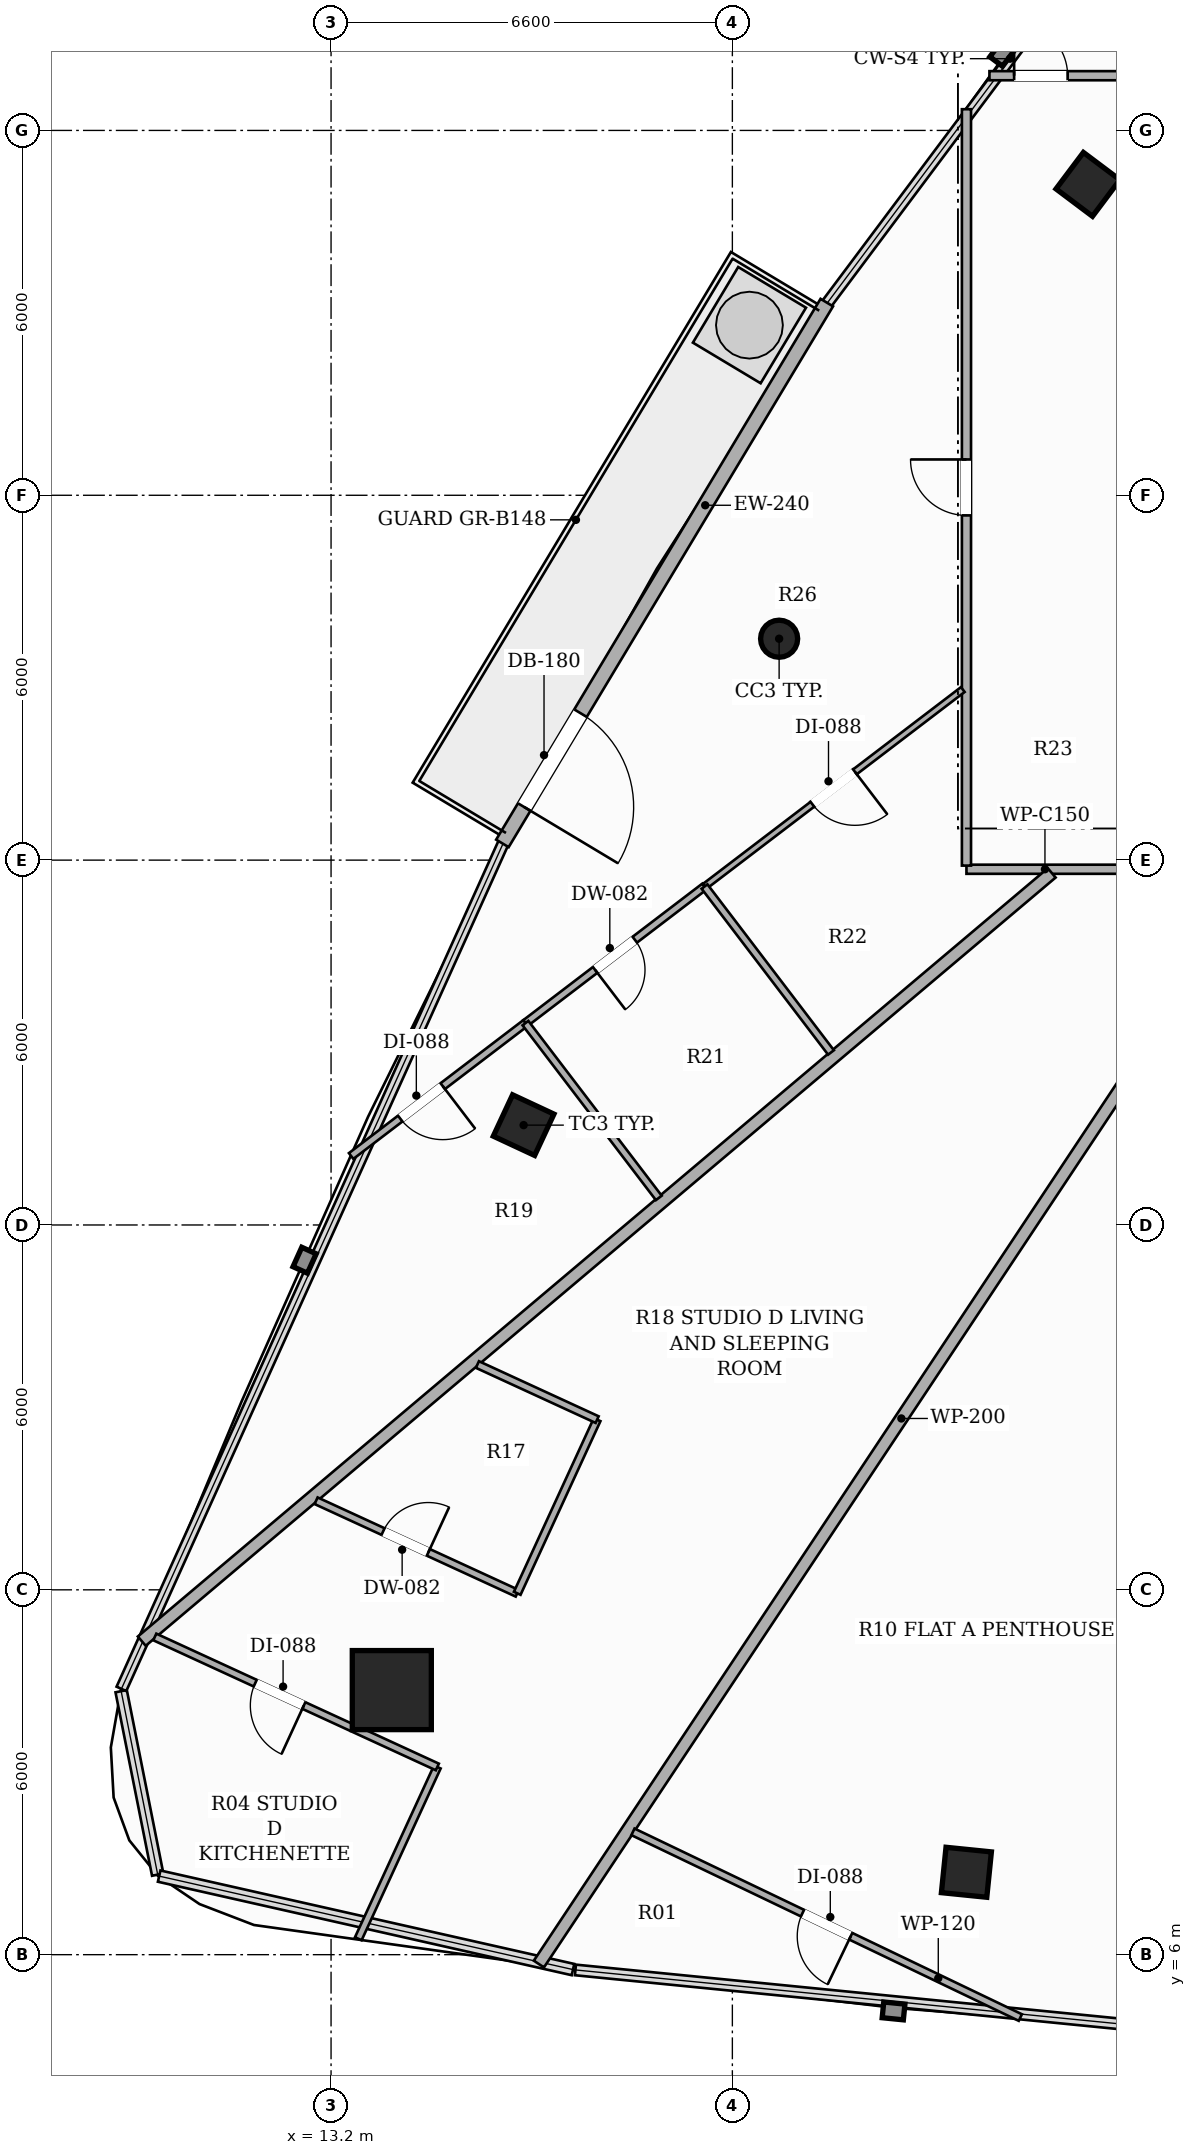
"""IFC4 building model, lengths in metres.
Left out: names, types, materials, properties, quantities, classifications, styles, units other than length and angle.
Written with IfcOpenShell. Run it as: python <this file> out.ifc"""

import sys

from ifc_helpers import new_model, si_unit, direction, frame, frame_2d, origin, origin_2d, place, context, subcontext, project, spatial, rectangle, hollow_rectangle, hollow_circle, extrude, element, fill, save


model = new_model("IFC4")
c1 = context("Model", 3, precision=1e-05, world=origin(), true_north=direction((0.0, 1.0)))
c2 = subcontext(c1, "Body", "Model", "MODEL_VIEW")
j1 = project(units=[si_unit("LENGTHUNIT", "METRE"), si_unit("PLANEANGLEUNIT", "RADIAN")], contexts=[c1])
p1 = place(None, origin())
s1 = spatial("IfcSite", under=j1, at=p1, CompositionType="ELEMENT")
p2 = place(p1, origin())
s2 = spatial("IfcBuilding", under=s1, at=p2, CompositionType="ELEMENT")
p3 = place(p2, frame((0.0, 0.0, 206.3)))
s3 = spatial("IfcBuildingStorey", under=s2, at=p3, CompositionType="ELEMENT", Elevation=206.3)
p4 = place(p3, frame((14.199, 10.351, 0.0), z_axis=(0.0, 0.0, 1.0), x_axis=(1.0, 0.0, 0.0)))
e1 = element("IfcColumn", 1, at=p4, inside=s3, PredefinedType="COLUMN", context=c2, shape_type="SweptSolid", body=[
    extrude(hollow_rectangle(XDim=1.3, YDim=1.3, WallThickness=0.04, at=origin_2d()), origin(), (0.0, 0.0, 1.0), 3.3),
])
p5 = place(p3, frame((25.648, 35.113, 0.0), z_axis=(0.0, 0.0, 1.0), x_axis=(0.600420225326, 0.799684658487, 0.0)))
e2 = element("IfcColumn", 2, at=p5, inside=s3, PredefinedType="COLUMN", context=c2, shape_type="SweptSolid", body=[
    extrude(hollow_rectangle(XDim=0.75, YDim=0.75, WallThickness=0.025, at=origin_2d()), origin(), (0.0, 0.0, 1.0), 3.3),
])
p6 = place(p3, frame((20.569, 27.641, 0.0), z_axis=(0.0, 0.0, 1.0), x_axis=(1.0, 0.0, 0.0)))
e3 = element("IfcColumn", 3, at=p6, inside=s3, PredefinedType="COLUMN", context=c2, shape_type="SweptSolid", body=[
    extrude(hollow_circle(Radius=0.305, WallThickness=0.016, at=origin_2d()), origin(), (0.0, 0.0, 1.0), 3.3),
])
for number, where, z_axis, x_axis in (
    (4, (16.367, 19.642, 0.0), (0.0, 0.0, 1.0), (0.423, 0.906, 0.0)),
    (5, (23.649, 7.355, 0.0), (0.0, 0.0, 1.0), (-0.995, 0.101, 0.0)),
):
    element("IfcColumn", number, at=place(p3, frame(where, z_axis=z_axis, x_axis=x_axis)), inside=s3, PredefinedType="COLUMN", context=c2, shape_type="SweptSolid", body=[
        extrude(hollow_rectangle(XDim=0.75, YDim=0.75, WallThickness=0.025, at=origin_2d()), origin(), (0.0, 0.0, 1.0), 3.3),
    ])
p7 = place(p3, frame((21.353, 33.169, 0.0), z_axis=(0.0, 0.0, 1.0), x_axis=(-0.514391899557, -0.857555230682, 0.0)))
e6 = element("IfcWall", 6, at=p7, inside=s3, PredefinedType="SOLIDWALL", context=c2, shape_type="SweptSolid", body=[
    extrude(rectangle(XDim=10.371, YDim=0.24, at=frame_2d((5.186, 0.0))), origin(), (0.0, 0.0, 1.0), 2.624),
])
p8 = place(p7, frame((7.874, 0.0, 0.0)))
e7 = element("IfcOpeningElement", 7, at=p8, cuts=e6, PredefinedType="OPENING", context=c2, shape_type="SweptSolid", body=[
    extrude(rectangle(XDim=1.8, YDim=2.2, at=frame_2d((0.9, 1.1))), frame((0.0, 0.13, 0.0), z_axis=(0.0, -1.0, 0.0), x_axis=(1.0, 0.0, 0.0)), (0.0, 0.0, 1.0), 0.26),
])
p9 = place(p3, frame((32.05, 23.85, 0.0), z_axis=(0.0, 0.0, 1.0), x_axis=(-1.0, 0.0, 0.0)))
e8 = element("IfcWall", 8, at=p9, inside=s3, PredefinedType="PARTITIONING", context=c2, shape_type="SweptSolid", body=[
    extrude(rectangle(XDim=8.4, YDim=0.15, at=frame_2d((4.2, 0.0))), origin(), (0.0, 0.0, 1.0), 2.565),
])
p10 = place(p9, frame((1.446, 0.0, 0.0)))
e9 = element("IfcOpeningElement", 9, at=p10, cuts=e8, PredefinedType="OPENING", context=c2, shape_type="SweptSolid", body=[
    extrude(rectangle(XDim=0.92, YDim=2.15, at=frame_2d((0.46, 1.075))), frame((0.0, 0.085, 0.0), z_axis=(0.0, -1.0, 0.0), x_axis=(1.0, 0.0, 0.0)), (0.0, 0.0, 1.0), 0.17),
])
p11 = place(p9, frame((4.798, 0.0, 0.0)))
e10 = element("IfcOpeningElement", 10, at=p11, cuts=e8, PredefinedType="OPENING", context=c2, shape_type="SweptSolid", body=[
    extrude(rectangle(XDim=0.92, YDim=2.15, at=frame_2d((0.46, 1.075))), frame((0.0, 0.085, 0.0), z_axis=(0.0, -1.0, 0.0), x_axis=(1.0, 0.0, 0.0)), (0.0, 0.0, 1.0), 0.17),
])
p12 = place(p3, frame((23.65, 23.91, 0.0), z_axis=(0.0, 0.0, 1.0), x_axis=(0.0, 1.0, 0.0)))
e11 = element("IfcWall", 11, at=p12, inside=s3, PredefinedType="PARTITIONING", context=c2, shape_type="SweptSolid", body=[
    extrude(rectangle(XDim=12.439, YDim=0.15, at=frame_2d((6.22, 0.0))), origin(), (0.0, 0.0, 1.0), 2.492),
])
p13 = place(p12, frame((5.759, 0.0, 0.0)))
e12 = element("IfcOpeningElement", 12, at=p13, cuts=e11, PredefinedType="OPENING", context=c2, shape_type="SweptSolid", body=[
    extrude(rectangle(XDim=0.92, YDim=2.15, at=frame_2d((0.46, 1.075))), frame((0.0, 0.085, 0.0), z_axis=(0.0, -1.0, 0.0), x_axis=(1.0, 0.0, 0.0)), (0.0, 0.0, 1.0), 0.17),
])
p14 = place(p3, frame((24.028, 36.9, 0.0), z_axis=(0.0, 0.0, 1.0), x_axis=(1.0, 0.0, 0.0)))
e13 = element("IfcWall", 13, at=p14, inside=s3, PredefinedType="PARTITIONING", context=c2, shape_type="SweptSolid", body=[
    extrude(rectangle(XDim=2.122, YDim=0.15, at=frame_2d((1.061, 0.0))), origin(), (0.0, 0.0, 1.0), 2.619),
])
p15 = place(p14, frame((0.406, 0.0, 0.0)))
e14 = element("IfcOpeningElement", 14, at=p15, cuts=e13, PredefinedType="OPENING", context=c2, shape_type="SweptSolid", body=[
    extrude(rectangle(XDim=0.88, YDim=2.1, at=frame_2d((0.44, 1.05))), frame((0.0, 0.085, 0.0), z_axis=(0.0, -1.0, 0.0), x_axis=(1.0, 0.0, 0.0)), (0.0, 0.0, 1.0), 0.17),
])
p16 = place(p3, frame((16.618, 5.846, 0.0), z_axis=(0.0, 0.0, 1.0), x_axis=(0.553425992232, 0.832898355817, 0.0)))
e15 = element("IfcWall", 15, at=p16, inside=s3, PredefinedType="PARTITIONING", context=c2, shape_type="SweptSolid", body=[
    extrude(rectangle(XDim=21.544, YDim=0.2, at=frame_2d((10.772, 0.0))), origin(), (0.0, 0.0, 1.0), 2.492),
])
p17 = place(p3, frame((10.087, 11.156, 0.0), z_axis=(0.0, 0.0, 1.0), x_axis=(0.76410924632, 0.645086862127, 0.0)))
e16 = element("IfcWall", 16, at=p17, inside=s3, PredefinedType="PARTITIONING", context=c2, shape_type="SweptSolid", body=[
    extrude(rectangle(XDim=19.585, YDim=0.2, at=frame_2d((9.792, 0.0))), origin(), (0.0, 0.0, 1.0), 2.492),
])
p18 = place(p3, frame((24.536, 4.966, 0.0), z_axis=(0.0, 0.0, 1.0), x_axis=(-0.901746721557, 0.432264791721, 0.0)))
e17 = element("IfcWall", 17, at=p18, inside=s3, PredefinedType="PARTITIONING", context=c2, shape_type="SweptSolid", body=[
    extrude(rectangle(XDim=7.065, YDim=0.12, at=frame_2d((3.532, 0.0))), origin(), (0.0, 0.0, 1.0), 2.619),
])
p19 = place(p18, frame((3.093, 0.0, 0.0)))
e18 = element("IfcOpeningElement", 18, at=p19, cuts=e17, PredefinedType="OPENING", context=c2, shape_type="SweptSolid", body=[
    extrude(rectangle(XDim=0.88, YDim=2.1, at=frame_2d((0.44, 1.05))), frame((0.0, 0.07, 0.0), z_axis=(0.0, -1.0, 0.0), x_axis=(1.0, 0.0, 0.0)), (0.0, 0.0, 1.0), 0.14),
])
p20 = place(p3, frame((12.954, 13.465, 0.0), z_axis=(0.0, 0.0, 1.0), x_axis=(0.908453283004, -0.41798640241, 0.0)))
e19 = element("IfcWall", 19, at=p20, inside=s3, PredefinedType="PARTITIONING", context=c2, shape_type="SweptSolid", body=[
    extrude(rectangle(XDim=3.641, YDim=0.12, at=frame_2d((1.821, 0.0))), origin(), (0.0, 0.0, 1.0), 2.492),
])
p21 = place(p20, frame((1.212, 0.0, 0.0)))
e20 = element("IfcOpeningElement", 20, at=p21, cuts=e19, PredefinedType="OPENING", context=c2, shape_type="SweptSolid", body=[
    extrude(rectangle(XDim=0.82, YDim=2.1, at=frame_2d((0.41, 1.05))), frame((0.0, 0.07, 0.0), z_axis=(0.0, -1.0, 0.0), x_axis=(1.0, 0.0, 0.0)), (0.0, 0.0, 1.0), 0.14),
])
p22 = place(p3, frame((16.262, 11.943, 0.0), z_axis=(0.0, 0.0, 1.0), x_axis=(0.417964576431, 0.908463324988, 0.0)))
e21 = element("IfcWall", 21, at=p22, inside=s3, PredefinedType="PARTITIONING", context=c2, shape_type="SweptSolid", body=[
    extrude(rectangle(XDim=3.144, YDim=0.12, at=frame_2d((1.572, 0.0))), origin(), (0.0, 0.0, 1.0), 2.565),
])
p23 = place(p3, frame((17.576, 14.799, 0.0), z_axis=(0.0, 0.0, 1.0), x_axis=(-0.908443405033, 0.418007870562, 0.0)))
e22 = element("IfcWall", 22, at=p23, inside=s3, PredefinedType="PARTITIONING", context=c2, shape_type="SweptSolid", body=[
    extrude(rectangle(XDim=2.167, YDim=0.12, at=frame_2d((1.084, 0.0))), origin(), (0.0, 0.0, 1.0), 2.492),
])
p24 = place(p3, frame((13.648, 6.262, 0.0), z_axis=(0.0, 0.0, 1.0), x_axis=(0.418057228076, 0.90842069222, 0.0)))
e23 = element("IfcWall", 23, at=p24, inside=s3, PredefinedType="PARTITIONING", context=c2, shape_type="SweptSolid", body=[
    extrude(rectangle(XDim=3.11, YDim=0.12, at=frame_2d((1.555, 0.0))), origin(), (0.0, 0.0, 1.0), 3.06),
])
p25 = place(p3, frame((14.948, 9.087, 0.0), z_axis=(0.0, 0.0, 1.0), x_axis=(-0.908447683715, 0.417998571712, 0.0)))
e24 = element("IfcWall", 24, at=p25, inside=s3, PredefinedType="PARTITIONING", context=c2, shape_type="SweptSolid", body=[
    extrude(rectangle(XDim=5.115, YDim=0.12, at=frame_2d((2.558, 0.0))), origin(), (0.0, 0.0, 1.0), 3.06),
])
p26 = place(p25, frame((2.417, 0.0, 0.0)))
e25 = element("IfcOpeningElement", 25, at=p26, cuts=e24, PredefinedType="OPENING", context=c2, shape_type="SweptSolid", body=[
    extrude(rectangle(XDim=0.88, YDim=2.1, at=frame_2d((0.44, 1.05))), frame((0.0, 0.07, 0.0), z_axis=(0.0, -1.0, 0.0), x_axis=(1.0, 0.0, 0.0)), (0.0, 0.0, 1.0), 0.14),
])
p27 = place(p3, frame((19.342, 23.566, 0.0), z_axis=(0.0, 0.0, 1.0), x_axis=(-0.795172892053, -0.606382776589, 0.0)))
e26 = element("IfcWall", 26, at=p27, inside=s3, PredefinedType="PARTITIONING", context=c2, shape_type="SweptSolid", body=[
    extrude(rectangle(XDim=3.704, YDim=0.12, at=frame_2d((1.852, 0.0))), origin(), (0.0, 0.0, 1.0), 2.492),
])
p28 = place(p27, frame((1.442, 0.0, 0.0)))
e27 = element("IfcOpeningElement", 27, at=p28, cuts=e26, PredefinedType="OPENING", context=c2, shape_type="SweptSolid", body=[
    extrude(rectangle(XDim=0.82, YDim=2.1, at=frame_2d((0.41, 1.05))), frame((0.0, 0.07, 0.0), z_axis=(0.0, -1.0, 0.0), x_axis=(1.0, 0.0, 0.0)), (0.0, 0.0, 1.0), 0.14),
])
p29 = place(p3, frame((16.397, 21.32, 0.0), z_axis=(0.0, 0.0, 1.0), x_axis=(-0.795204709159, -0.606341051333, 0.0)))
e28 = element("IfcWall", 28, at=p29, inside=s3, PredefinedType="PARTITIONING", context=c2, shape_type="SweptSolid", body=[
    extrude(rectangle(XDim=3.605, YDim=0.12, at=frame_2d((1.803, 0.0))), origin(), (0.0, 0.0, 1.0), 3.06),
])
p30 = place(p29, frame((1.71, 0.0, 0.0)))
e29 = element("IfcOpeningElement", 29, at=p30, cuts=e28, PredefinedType="OPENING", context=c2, shape_type="SweptSolid", body=[
    extrude(rectangle(XDim=0.88, YDim=2.1, at=frame_2d((0.44, 1.05))), frame((0.0, 0.07, 0.0), z_axis=(0.0, -1.0, 0.0), x_axis=(1.0, 0.0, 0.0)), (0.0, 0.0, 1.0), 0.14),
])
p31 = place(p3, frame((23.59, 26.805, 0.0), z_axis=(0.0, 0.0, 1.0), x_axis=(-0.795214502583, -0.606328207228, 0.0)))
e30 = element("IfcWall", 30, at=p31, inside=s3, PredefinedType="PARTITIONING", context=c2, shape_type="SweptSolid", body=[
    extrude(rectangle(XDim=5.342, YDim=0.1, at=frame_2d((2.671, 0.0))), origin(), (0.0, 0.0, 1.0), 2.773),
])
p32 = place(p31, frame((2.231, 0.0, 0.0)))
e31 = element("IfcOpeningElement", 31, at=p32, cuts=e30, PredefinedType="OPENING", context=c2, shape_type="SweptSolid", body=[
    extrude(rectangle(XDim=0.88, YDim=2.1, at=frame_2d((0.44, 1.05))), frame((0.0, 0.06, 0.0), z_axis=(0.0, -1.0, 0.0), x_axis=(1.0, 0.0, 0.0)), (0.0, 0.0, 1.0), 0.12),
])
p33 = place(p3, frame((18.59, 18.445, 0.0), z_axis=(0.0, 0.0, 1.0), x_axis=(-0.606504882674, 0.795079761591, 0.0)))
e32 = element("IfcWall", 32, at=p33, inside=s3, PredefinedType="PARTITIONING", context=c2, shape_type="SweptSolid", body=[
    extrude(rectangle(XDim=3.616, YDim=0.12, at=frame_2d((1.808, 0.0))), origin(), (0.0, 0.0, 1.0), 2.492),
])
p34 = place(p3, frame((19.342, 23.566, 0.0), z_axis=(0.0, 0.0, 1.0), x_axis=(0.60619754922, -0.795314108589, 0.0)))
e33 = element("IfcWall", 33, at=p34, inside=s3, PredefinedType="PARTITIONING", context=c2, shape_type="SweptSolid", body=[
    extrude(rectangle(XDim=3.431, YDim=0.12, at=frame_2d((1.716, 0.0))), origin(), (0.0, 0.0, 1.0), 2.773),
])
p35 = place(p8, origin())
e34 = element("IfcDoor", 34, at=p35, inside=s3, OperationType="SINGLE_SWING_RIGHT", PredefinedType="DOOR", context=c2, shape_type="SweptSolid", body=[
    extrude(rectangle(XDim=1.8, YDim=2.2, at=frame_2d((0.9, 1.1))), frame((0.0, 0.025, 0.0), z_axis=(0.0, -1.0, 0.0), x_axis=(1.0, 0.0, 0.0)), (0.0, 0.0, 1.0), 0.05),
])
fill(e7, e34)
p36 = place(p19, origin())
e35 = element("IfcDoor", 35, at=p36, inside=s3, OperationType="SINGLE_SWING_LEFT", PredefinedType="DOOR", context=c2, shape_type="SweptSolid", body=[
    extrude(rectangle(XDim=0.88, YDim=2.1, at=frame_2d((0.44, 1.05))), frame((0.0, 0.025, 0.0), z_axis=(0.0, -1.0, 0.0), x_axis=(1.0, 0.0, 0.0)), (0.0, 0.0, 1.0), 0.05),
])
fill(e18, e35)
p37 = place(p21, origin())
e36 = element("IfcDoor", 36, at=p37, inside=s3, OperationType="SINGLE_SWING_RIGHT", PredefinedType="DOOR", context=c2, shape_type="SweptSolid", body=[
    extrude(rectangle(XDim=0.82, YDim=2.1, at=frame_2d((0.41, 1.05))), frame((0.0, 0.025, 0.0), z_axis=(0.0, -1.0, 0.0), x_axis=(1.0, 0.0, 0.0)), (0.0, 0.0, 1.0), 0.05),
])
fill(e20, e36)
p38 = place(p26, origin())
e37 = element("IfcDoor", 37, at=p38, inside=s3, OperationType="SINGLE_SWING_LEFT", PredefinedType="DOOR", context=c2, shape_type="SweptSolid", body=[
    extrude(rectangle(XDim=0.88, YDim=2.1, at=frame_2d((0.44, 1.05))), frame((0.0, 0.025, 0.0), z_axis=(0.0, -1.0, 0.0), x_axis=(1.0, 0.0, 0.0)), (0.0, 0.0, 1.0), 0.05),
])
fill(e25, e37)
p39 = place(p13, origin())
e38 = element("IfcDoor", 38, at=p39, inside=s3, OperationType="SINGLE_SWING_RIGHT", PredefinedType="DOOR", context=c2, shape_type="SweptSolid", body=[
    extrude(rectangle(XDim=0.92, YDim=2.15, at=frame_2d((0.46, 1.075))), frame((0.0, 0.025, 0.0), z_axis=(0.0, -1.0, 0.0), x_axis=(1.0, 0.0, 0.0)), (0.0, 0.0, 1.0), 0.05),
])
fill(e12, e38)
p40 = place(p28, origin())
e39 = element("IfcDoor", 39, at=p40, inside=s3, OperationType="SINGLE_SWING_RIGHT", PredefinedType="DOOR", context=c2, shape_type="SweptSolid", body=[
    extrude(rectangle(XDim=0.82, YDim=2.1, at=frame_2d((0.41, 1.05))), frame((0.0, 0.025, 0.0), z_axis=(0.0, -1.0, 0.0), x_axis=(1.0, 0.0, 0.0)), (0.0, 0.0, 1.0), 0.05),
])
fill(e27, e39)
p41 = place(p30, origin())
e40 = element("IfcDoor", 40, at=p41, inside=s3, OperationType="SINGLE_SWING_LEFT", PredefinedType="DOOR", context=c2, shape_type="SweptSolid", body=[
    extrude(rectangle(XDim=0.88, YDim=2.1, at=frame_2d((0.44, 1.05))), frame((0.0, 0.025, 0.0), z_axis=(0.0, -1.0, 0.0), x_axis=(1.0, 0.0, 0.0)), (0.0, 0.0, 1.0), 0.05),
])
fill(e29, e40)
p42 = place(p32, origin())
e41 = element("IfcDoor", 41, at=p42, inside=s3, OperationType="SINGLE_SWING_LEFT", PredefinedType="DOOR", context=c2, shape_type="SweptSolid", body=[
    extrude(rectangle(XDim=0.88, YDim=2.1, at=frame_2d((0.44, 1.05))), frame((0.0, 0.025, 0.0), z_axis=(0.0, -1.0, 0.0), x_axis=(1.0, 0.0, 0.0)), (0.0, 0.0, 1.0), 0.05),
])
fill(e31, e41)
p43 = place(p15, origin())
e42 = element("IfcDoor", 42, at=p43, inside=s3, OperationType="SINGLE_SWING_LEFT", PredefinedType="DOOR", context=c2, shape_type="SweptSolid", body=[
    extrude(rectangle(XDim=0.88, YDim=2.1, at=frame_2d((0.44, 1.05))), frame((0.0, 0.025, 0.0), z_axis=(0.0, -1.0, 0.0), x_axis=(1.0, 0.0, 0.0)), (0.0, 0.0, 1.0), 0.05),
])
fill(e14, e42)
save(model, sys.argv[1])
